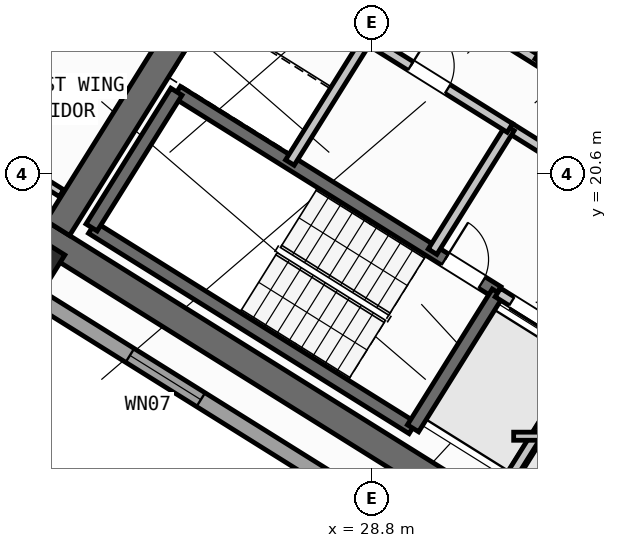
"""IFC4 building model, lengths in metres.
Left out: names, types, materials, properties, quantities, classifications, styles, units other than length and angle.
Written with IfcOpenShell. Run it as: python <this file> out.ifc"""

import sys

from ifc_helpers import new_model, si_unit, direction, frame, frame_2d, origin, origin_2d, place, context, subcontext, project, spatial, rectangle, hollow_rectangle, extrude, source, transform, mapped, element, fill, save


model = new_model("IFC4")
c1 = context("Model", 3, precision=1e-05, world=origin(), true_north=direction((0.0, 1.0)))
c2 = subcontext(c1, "Body", "Model", "MODEL_VIEW")
j1 = project(units=[si_unit("LENGTHUNIT", "METRE"), si_unit("PLANEANGLEUNIT", "RADIAN")], contexts=[c1])
p1 = place(None, origin())
s1 = spatial("IfcSite", under=j1, at=p1, CompositionType="ELEMENT")
p2 = place(p1, origin())
s2 = spatial("IfcBuilding", under=s1, at=p2, CompositionType="ELEMENT")
p3 = place(p2, frame((0.0, 0.0, 204.0)))
s3 = spatial("IfcBuildingStorey", under=s2, at=p3, CompositionType="ELEMENT", Elevation=204.0)
p4 = place(p3, frame((33.366, 12.477, 0.0), z_axis=(0.0, 0.0, 1.0), x_axis=(-0.848047359947, 0.529920442413, 0.0)))
e1 = element("IfcWall", 1, at=p4, inside=s3, PredefinedType="SHEAR", context=c2, shape_type="SweptSolid", body=[
    extrude(rectangle(XDim=13.14, YDim=0.55, at=frame_2d((6.57, 0.0))), origin(), (0.0, 0.0, 1.0), 3.35),
])
p5 = place(p3, frame((26.007, 24.976, 0.0), z_axis=(0.0, 0.0, 1.0), x_axis=(-0.529923795287, -0.848045264823, 0.0)))
e2 = element("IfcWall", 2, at=p5, inside=s3, PredefinedType="SHEAR", context=c2, shape_type="SweptSolid", body=[
    extrude(rectangle(XDim=6.425, YDim=0.55, at=frame_2d((3.212, 0.0))), origin(), (0.0, 0.0, 1.0), 3.35),
])
m1 = source(origin(), c2, "Body", "SweptSolid", [
    extrude(hollow_rectangle(XDim=0.8, YDim=0.8, WallThickness=0.032, at=origin_2d()), origin(), (0.0, 0.0, 1.0), 3.6),
])
p6 = place(p3, frame((22.191, 18.87, 0.0), z_axis=(0.0, 0.0, 1.0), x_axis=(-0.848048096156, 0.529919264233, 0.0)))
e3 = element("IfcColumn", 3, at=p6, inside=s3, PredefinedType="COLUMN", context=c2, shape_type="MappedRepresentation", body=[
    mapped(m1, transform((0.0, 0.0, 0.0), scale=1.0)),
])
p7 = place(p3, frame((31.76, 12.183, 0.0), z_axis=(0.0, 0.0, 1.0), x_axis=(-0.848047074256, 0.529920899612, 0.0)))
e4 = element("IfcWall", 4, at=p7, inside=s3, PredefinedType="STANDARD", context=c2, shape_type="SweptSolid", body=[
    extrude(rectangle(XDim=30.652, YDim=0.32, at=frame_2d((15.326, 0.0))), origin(), (0.0, 0.0, 1.0), 3.35),
])
p8 = place(p7, frame((15.166, 0.0, 0.0)))
e5 = element("IfcOpeningElement", 5, at=p8, cuts=e4, PredefinedType="OPENING", context=c2, shape_type="SweptSolid", body=[
    extrude(rectangle(XDim=1.2, YDim=2.15, at=frame_2d((0.6, 1.075))), frame((0.0, 0.17, 0.0), z_axis=(0.0, -1.0, 0.0), x_axis=(1.0, 0.0, 0.0)), (0.0, 0.0, 1.0), 0.34),
])
p9 = place(p7, frame((2.24, 0.0, 0.9)))
e6 = element("IfcOpeningElement", 6, at=p9, cuts=e4, PredefinedType="OPENING", context=c2, shape_type="SweptSolid", body=[
    extrude(rectangle(XDim=1.65, YDim=1.45, at=frame_2d((0.825, 0.725))), frame((0.0, 0.17, 0.0), z_axis=(0.0, -1.0, 0.0), x_axis=(1.0, 0.0, 0.0)), (0.0, 0.0, 1.0), 0.34),
])
p10 = place(p7, frame((7.469, 0.0, 0.9)))
e7 = element("IfcOpeningElement", 7, at=p10, cuts=e4, PredefinedType="OPENING", context=c2, shape_type="SweptSolid", body=[
    extrude(rectangle(XDim=1.65, YDim=1.45, at=frame_2d((0.825, 0.725))), frame((0.0, 0.17, 0.0), z_axis=(0.0, -1.0, 0.0), x_axis=(1.0, 0.0, 0.0)), (0.0, 0.0, 1.0), 0.34),
])
p11 = place(p7, frame((12.623, 0.0, 1.0)))
e8 = element("IfcOpeningElement", 8, at=p11, cuts=e4, PredefinedType="OPENING", context=c2, shape_type="SweptSolid", body=[
    extrude(rectangle(XDim=0.9, YDim=1.25, at=frame_2d((0.45, 0.625))), frame((0.0, 0.17, 0.0), z_axis=(0.0, -1.0, 0.0), x_axis=(1.0, 0.0, 0.0)), (0.0, 0.0, 1.0), 0.34),
])
p12 = place(p7, frame((19.556, 0.0, 1.0)))
e9 = element("IfcOpeningElement", 9, at=p12, cuts=e4, PredefinedType="OPENING", context=c2, shape_type="SweptSolid", body=[
    extrude(rectangle(XDim=0.9, YDim=1.25, at=frame_2d((0.45, 0.625))), frame((0.0, 0.17, 0.0), z_axis=(0.0, -1.0, 0.0), x_axis=(1.0, 0.0, 0.0)), (0.0, 0.0, 1.0), 0.34),
])
p13 = place(p7, frame((21.95, 0.0, 1.0)))
e10 = element("IfcOpeningElement", 10, at=p13, cuts=e4, PredefinedType="OPENING", context=c2, shape_type="SweptSolid", body=[
    extrude(rectangle(XDim=0.9, YDim=1.25, at=frame_2d((0.45, 0.625))), frame((0.0, 0.17, 0.0), z_axis=(0.0, -1.0, 0.0), x_axis=(1.0, 0.0, 0.0)), (0.0, 0.0, 1.0), 0.34),
])
p14 = place(p7, frame((26.983, 0.0, 0.9)))
e11 = element("IfcOpeningElement", 11, at=p14, cuts=e4, PredefinedType="OPENING", context=c2, shape_type="SweptSolid", body=[
    extrude(rectangle(XDim=1.35, YDim=1.45, at=frame_2d((0.675, 0.725))), frame((0.0, 0.17, 0.0), z_axis=(0.0, -1.0, 0.0), x_axis=(1.0, 0.0, 0.0)), (0.0, 0.0, 1.0), 0.34),
])
p15 = place(p3, frame((29.605, 15.581, 0.0), z_axis=(0.0, 0.0, 1.0), x_axis=(-0.848036911448, 0.529937163087, 0.0)))
e12 = element("IfcWall", 12, at=p15, inside=s3, PredefinedType="SHEAR", context=c2, shape_type="SweptSolid", body=[
    extrude(rectangle(XDim=7.46, YDim=0.26, at=frame_2d((3.73, 0.0))), origin(), (0.0, 0.0, 1.0), 3.35),
])
p16 = place(p3, frame((31.28, 18.261, 0.0), z_axis=(0.0, 0.0, 1.0), x_axis=(-0.848051618787, 0.529913626805, 0.0)))
e13 = element("IfcWall", 13, at=p16, inside=s3, PredefinedType="SHEAR", context=c2, shape_type="SweptSolid", body=[
    extrude(rectangle(XDim=7.46, YDim=0.26, at=frame_2d((3.73, 0.0))), origin(), (0.0, 0.0, 1.0), 3.35),
])
p17 = place(p16, frame((0.36, 0.0, 0.0)))
e14 = element("IfcOpeningElement", 14, at=p17, cuts=e13, PredefinedType="OPENING", context=c2, shape_type="SweptSolid", body=[
    extrude(rectangle(XDim=0.86, YDim=2.05, at=frame_2d((0.43, 1.025))), frame((0.0, 0.14, 0.0), z_axis=(0.0, -1.0, 0.0), x_axis=(1.0, 0.0, 0.0)), (0.0, 0.0, 1.0), 0.28),
])
p18 = place(p3, frame((31.288, 18.256, 0.0), z_axis=(0.0, 0.0, 1.0), x_axis=(-0.529943379326, -0.848033026897, 0.0)))
e15 = element("IfcWall", 15, at=p18, inside=s3, PredefinedType="SHEAR", context=c2, shape_type="SweptSolid", body=[
    extrude(rectangle(XDim=3.16, YDim=0.26, at=frame_2d((1.58, 0.0))), origin(), (0.0, 0.0, 1.0), 3.35),
])
p19 = place(p3, frame((24.945, 22.22, 0.0), z_axis=(0.0, 0.0, 1.0), x_axis=(-0.529908658664, -0.84805472316, 0.0)))
e16 = element("IfcWall", 16, at=p19, inside=s3, PredefinedType="SHEAR", context=c2, shape_type="SweptSolid", body=[
    extrude(rectangle(XDim=3.16, YDim=0.26, at=frame_2d((1.58, 0.0))), origin(), (0.0, 0.0, 1.0), 3.35),
])
p20 = place(p3, frame((38.046, 21.108, 0.0), z_axis=(0.0, 0.0, 1.0), x_axis=(-0.848054434086, 0.529909121291, 0.0)))
e17 = element("IfcWall", 17, at=p20, inside=s3, PredefinedType="SHEAR", context=c2, shape_type="SweptSolid", body=[
    extrude(rectangle(XDim=7.33, YDim=0.26, at=frame_2d((3.665, 0.0))), origin(), (0.0, 0.0, 1.0), 3.35),
])
p21 = place(p20, frame((0.22, 0.0, 0.0)))
e18 = element("IfcOpeningElement", 18, at=p21, cuts=e17, PredefinedType="OPENING", context=c2, shape_type="SweptSolid", body=[
    extrude(rectangle(XDim=1.1, YDim=2.1, at=frame_2d((0.55, 1.05))), frame((0.0, 0.14, 0.0), z_axis=(0.0, -1.0, 0.0), x_axis=(1.0, 0.0, 0.0)), (0.0, 0.0, 1.0), 0.28),
])
p22 = place(p3, frame((34.891, 16.005, 0.0), z_axis=(0.0, 0.0, 1.0), x_axis=(-0.848062873452, 0.529895614884, 0.0)))
e19 = element("IfcWall", 19, at=p22, inside=s3, PredefinedType="STANDARD", context=c2, shape_type="SweptSolid", body=[
    extrude(rectangle(XDim=4.248, YDim=0.2, at=frame_2d((2.124, 0.0))), origin(), (0.0, 0.0, 1.0), 3.34),
])
p23 = place(p22, frame((0.398, 0.0, 0.0)))
e20 = element("IfcOpeningElement", 20, at=p23, cuts=e19, PredefinedType="OPENING", context=c2, shape_type="SweptSolid", body=[
    extrude(rectangle(XDim=1.3, YDim=2.2, at=frame_2d((0.65, 1.1))), frame((0.0, 0.11, 0.0), z_axis=(0.0, -1.0, 0.0), x_axis=(1.0, 0.0, 0.0)), (0.0, 0.0, 1.0), 0.22),
])
p24 = place(p22, frame((2.473, 0.0, 0.0)))
e21 = element("IfcOpeningElement", 21, at=p24, cuts=e19, PredefinedType="OPENING", context=c2, shape_type="SweptSolid", body=[
    extrude(rectangle(XDim=1.45, YDim=2.25, at=frame_2d((0.725, 1.125))), frame((0.0, 0.11, 0.0), z_axis=(0.0, -1.0, 0.0), x_axis=(1.0, 0.0, 0.0)), (0.0, 0.0, 1.0), 0.22),
])
p25 = place(p3, frame((36.417, 18.447, 0.0), z_axis=(0.0, 0.0, 1.0), x_axis=(-0.848064879198, 0.529892404805, 0.0)))
e22 = element("IfcWall", 22, at=p25, inside=s3, PredefinedType="STANDARD", context=c2, shape_type="SweptSolid", body=[
    extrude(rectangle(XDim=5.768, YDim=0.2, at=frame_2d((2.884, 0.0))), origin(), (0.0, 0.0, 1.0), 3.34),
])
p26 = place(p25, frame((2.548, 0.0, 0.0)))
e23 = element("IfcOpeningElement", 23, at=p26, cuts=e22, PredefinedType="OPENING", context=c2, shape_type="SweptSolid", body=[
    extrude(rectangle(XDim=1.15, YDim=2.1, at=frame_2d((0.575, 1.05))), frame((0.0, 0.11, 0.0), z_axis=(0.0, -1.0, 0.0), x_axis=(1.0, 0.0, 0.0)), (0.0, 0.0, 1.0), 0.22),
])
p27 = place(p3, frame((32.108, 22.814, 0.0), z_axis=(0.0, 0.0, 1.0), x_axis=(-0.848042229521, 0.529928652696, 0.0)))
e24 = element("IfcWall", 24, at=p27, inside=s3, PredefinedType="STANDARD", context=c2, shape_type="SweptSolid", body=[
    extrude(rectangle(XDim=5.62, YDim=0.2, at=frame_2d((2.81, 0.0))), origin(), (0.0, 0.0, 1.0), 3.34),
])
p28 = place(p3, frame((32.982, 24.213, 0.0), z_axis=(0.0, 0.0, 1.0), x_axis=(-0.529839334948, -0.84809803628, 0.0)))
e25 = element("IfcWall", 25, at=p28, inside=s3, PredefinedType="STANDARD", context=c2, shape_type="SweptSolid", body=[
    extrude(rectangle(XDim=1.65, YDim=0.2, at=frame_2d((0.825, 0.0))), origin(), (0.0, 0.0, 1.0), 3.34),
])
p29 = place(p3, frame((33.029, 17.003, 0.0), z_axis=(0.0, 0.0, 1.0), x_axis=(-0.529916267533, -0.848049968695, 0.0)))
e26 = element("IfcWall", 26, at=p29, inside=s3, PredefinedType="STANDARD", context=c2, shape_type="SweptSolid", body=[
    extrude(rectangle(XDim=2.92, YDim=0.2, at=frame_2d((1.46, 0.0))), origin(), (0.0, 0.0, 1.0), 3.34),
])
for number, where, z_axis, x_axis in (
    (27, (31.525, 21.504, 0.0), (0.0, 0.0, 1.0), (-0.53, -0.848, 0.0)),
    (28, (28.71, 23.263, 0.0), (0.0, 0.0, 1.0), (-0.53, -0.848, 0.0)),
):
    element("IfcWall", number, at=place(p3, frame(where, z_axis=z_axis, x_axis=x_axis)), inside=s3, PredefinedType="STANDARD", context=c2, shape_type="SweptSolid", body=[
        extrude(rectangle(XDim=2.88, YDim=0.2, at=frame_2d((1.44, 0.0))), origin(), (0.0, 0.0, 1.0), 3.34),
    ])
p30 = place(p3, frame((31.525, 21.504, 0.0), z_axis=(0.0, 0.0, 1.0), x_axis=(-0.848040211232, 0.529931882541, 0.0)))
e29 = element("IfcWall", 29, at=p30, inside=s3, PredefinedType="STANDARD", context=c2, shape_type="SweptSolid", body=[
    extrude(rectangle(XDim=6.218, YDim=0.2, at=frame_2d((3.109, 0.0))), origin(), (0.0, 0.0, 1.0), 3.34),
])
p31 = place(p30, frame((4.4, 0.0, 0.0)))
e30 = element("IfcOpeningElement", 30, at=p31, cuts=e29, PredefinedType="OPENING", context=c2, shape_type="SweptSolid", body=[
    extrude(rectangle(XDim=0.86, YDim=2.05, at=frame_2d((0.43, 1.025))), frame((0.0, 0.11, 0.0), z_axis=(0.0, -1.0, 0.0), x_axis=(1.0, 0.0, 0.0)), (0.0, 0.0, 1.0), 0.22),
])
p32 = place(p30, frame((1.45, 0.0, 0.0)))
e31 = element("IfcOpeningElement", 31, at=p32, cuts=e29, PredefinedType="OPENING", context=c2, shape_type="SweptSolid", body=[
    extrude(rectangle(XDim=0.86, YDim=2.05, at=frame_2d((0.43, 1.025))), frame((0.0, 0.11, 0.0), z_axis=(0.0, -1.0, 0.0), x_axis=(1.0, 0.0, 0.0)), (0.0, 0.0, 1.0), 0.22),
])
p33 = place(p3, frame((22.677, 20.217, 0.0), z_axis=(0.0, 0.0, 1.0), x_axis=(-0.848057719594, 0.529903863203, 0.0)))
e32 = element("IfcWall", 32, at=p33, inside=s3, PredefinedType="PARTITIONING", context=c2, shape_type="SweptSolid", body=[
    extrude(rectangle(XDim=2.308, YDim=0.16, at=frame_2d((1.154, 0.0))), origin(), (0.0, 0.0, 1.0), 3.34),
])
p34 = place(p3, frame((31.6, 15.42, 0.0), z_axis=(0.0, 0.0, 1.0), x_axis=(1.0, 0.0, 0.0)))
e33 = element("IfcWall", 33, at=p34, inside=s3, PredefinedType="PARTITIONING", context=c2, shape_type="SweptSolid", body=[
    extrude(rectangle(XDim=2.925, YDim=0.16, at=frame_2d((1.462, 0.0))), origin(), (0.0, 0.0, 1.0), 3.34),
])
m2 = source(origin(), c2, "Body", "SweptSolid", [
    extrude(rectangle(XDim=1.65, YDim=1.45, at=frame_2d((0.825, 0.725))), frame((0.0, 0.03, 0.0), z_axis=(0.0, -1.0, 0.0), x_axis=(1.0, 0.0, 0.0)), (0.0, 0.0, 1.0), 0.06),
])
p35 = place(p10, origin())
e34 = element("IfcWindow", 34, at=p35, inside=s3, PartitioningType="SINGLE_PANEL", PredefinedType="WINDOW", context=c2, shape_type="MappedRepresentation", body=[
    mapped(m2, transform((0.0, 0.0, 0.0), scale=1.0)),
])
fill(e7, e34)
m3 = source(origin(), c2, "Body", "SweptSolid", [
    extrude(rectangle(XDim=0.86, YDim=2.05, at=frame_2d((0.43, 1.025))), frame((0.0, 0.025, 0.0), z_axis=(0.0, -1.0, 0.0), x_axis=(1.0, 0.0, 0.0)), (0.0, 0.0, 1.0), 0.05),
])
p36 = place(p17, frame((0.86, 0.0, 0.0), z_axis=(0.0, 0.0, 1.0), x_axis=(-1.0, 0.0, 0.0)))
e35 = element("IfcDoor", 35, at=p36, inside=s3, OperationType="SINGLE_SWING_LEFT", PredefinedType="DOOR", context=c2, shape_type="MappedRepresentation", body=[
    mapped(m3, transform((0.0, 0.0, 0.0), scale=1.0)),
])
fill(e14, e35)
m4 = source(origin(), c2, "Body", "SweptSolid", [
    extrude(rectangle(XDim=1.45, YDim=2.25, at=frame_2d((0.725, 1.125))), frame((0.0, 0.025, 0.0), z_axis=(0.0, -1.0, 0.0), x_axis=(1.0, 0.0, 0.0)), (0.0, 0.0, 1.0), 0.05),
])
p37 = place(p24, origin())
e36 = element("IfcDoor", 36, at=p37, inside=s3, OperationType="DOUBLE_DOOR_SLIDING", PredefinedType="DOOR", context=c2, shape_type="MappedRepresentation", body=[
    mapped(m4, transform((0.0, 0.0, 0.0), scale=1.0)),
])
fill(e21, e36)
p38 = place(p32, frame((0.86, 0.0, 0.0), z_axis=(0.0, 0.0, 1.0), x_axis=(-1.0, 0.0, 0.0)))
e37 = element("IfcDoor", 37, at=p38, inside=s3, OperationType="SINGLE_SWING_LEFT", PredefinedType="DOOR", context=c2, shape_type="MappedRepresentation", body=[
    mapped(m3, transform((0.0, 0.0, 0.0), scale=1.0)),
])
fill(e31, e37)
save(model, sys.argv[1])
